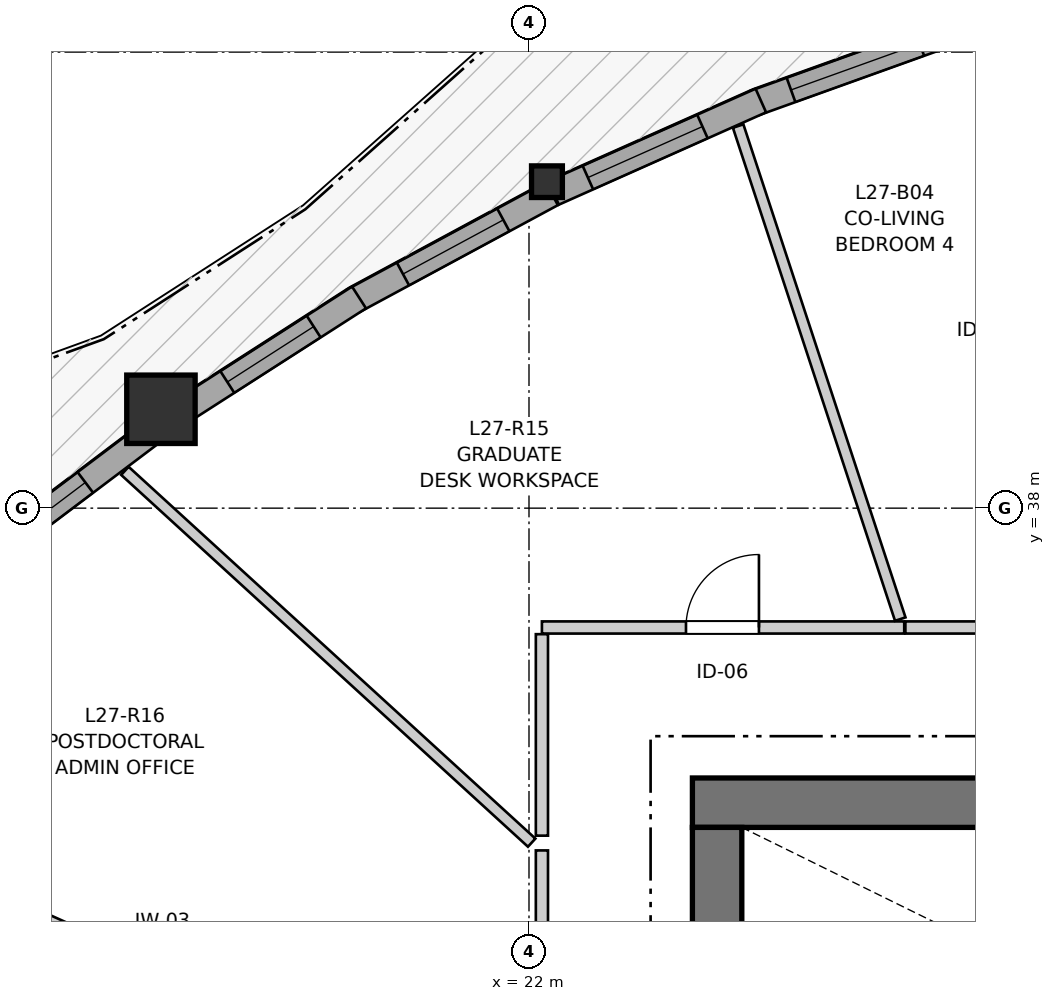
"""IFC4 building model, lengths in metres.
Left out: names, types, materials, properties, quantities, classifications, styles, units other than length and angle.
Written with IfcOpenShell. Run it as: python <this file> out.ifc"""

import sys

from ifc_helpers import new_model, si_unit, direction, frame, frame_2d, origin, origin_2d, place, context, subcontext, project, spatial, rectangle, i_section, extrude, source, transform, mapped, element, fill, save


model = new_model("IFC4")
c1 = context("Model", 3, precision=1e-05, world=origin(), true_north=direction((0.0, 1.0)))
c2 = subcontext(c1, "Body", "Model", "MODEL_VIEW")
j1 = project(units=[si_unit("LENGTHUNIT", "METRE"), si_unit("PLANEANGLEUNIT", "RADIAN")], contexts=[c1])
p1 = place(None, origin())
s1 = spatial("IfcSite", under=j1, at=p1, CompositionType="ELEMENT")
p2 = place(p1, origin())
s2 = spatial("IfcBuilding", under=s1, at=p2, CompositionType="ELEMENT")
p3 = place(p2, frame((0.0, 0.0, 92.8)))
s3 = spatial("IfcBuildingStorey", under=s2, at=p3, CompositionType="ELEMENT", Elevation=92.8)
p4 = place(p3, frame((36.55, 34.125, 0.0), z_axis=(0.0, 0.0, 1.0), x_axis=(-1.0, 0.0, 0.0)))
e1 = element("IfcWall", 1, at=p4, inside=s3, PredefinedType="SHEAR", context=c2, shape_type="SweptSolid", body=[
    extrude(rectangle(XDim=12.4, YDim=0.65, at=frame_2d((6.2, 0.0))), origin(), (0.0, 0.0, 1.0), 2.95),
])
p5 = place(p3, frame((24.475, 33.8, 0.0), z_axis=(0.0, 0.0, 1.0), x_axis=(0.0, -1.0, 0.0)))
e2 = element("IfcWall", 2, at=p5, inside=s3, PredefinedType="SHEAR", context=c2, shape_type="SweptSolid", body=[
    extrude(rectangle(XDim=15.6, YDim=0.65, at=frame_2d((7.8, 0.0))), origin(), (0.0, 0.0, 1.0), 2.95),
])
p6 = place(p5, frame((7.05, 0.0, 0.0)))
e3 = element("IfcOpeningElement", 3, at=p6, cuts=e2, PredefinedType="OPENING", context=c2, shape_type="SweptSolid", body=[
    extrude(rectangle(XDim=1.5, YDim=2.15, at=frame_2d((0.75, 1.075))), frame((0.0, 0.335, 0.0), z_axis=(0.0, -1.0, 0.0), x_axis=(1.0, 0.0, 0.0)), (0.0, 0.0, 1.0), 0.67),
])
p7 = place(p5, frame((3.52, 0.0, 0.0)))
e4 = element("IfcOpeningElement", 4, at=p7, cuts=e2, PredefinedType="OPENING", context=c2, shape_type="SweptSolid", body=[
    extrude(rectangle(XDim=0.86, YDim=2.05, at=frame_2d((0.43, 1.025))), frame((0.0, 0.335, 0.0), z_axis=(0.0, -1.0, 0.0), x_axis=(1.0, 0.0, 0.0)), (0.0, 0.0, 1.0), 0.67),
])
p8 = place(p5, frame((11.22, 0.0, 0.0)))
e5 = element("IfcOpeningElement", 5, at=p8, cuts=e2, PredefinedType="OPENING", context=c2, shape_type="SweptSolid", body=[
    extrude(rectangle(XDim=0.86, YDim=2.05, at=frame_2d((0.43, 1.025))), frame((0.0, 0.335, 0.0), z_axis=(0.0, -1.0, 0.0), x_axis=(1.0, 0.0, 0.0)), (0.0, 0.0, 1.0), 0.67),
])
m1 = source(origin(), c2, "Body", "SweptSolid", [
    extrude(i_section(OverallWidth=0.406, OverallDepth=0.416, WebThickness=0.027, FlangeThickness=0.044, FilletRadius=0.015, at=origin_2d()), origin(), (0.0, 0.0, 1.0), 2.95),
])
p9 = place(p3, frame((22.236, 42.295, 0.0), z_axis=(0.0, 0.0, 1.0), x_axis=(1.0, 0.0, 0.0)))
e6 = element("IfcColumn", 6, at=p9, inside=s3, PredefinedType="PILASTER", context=c2, shape_type="MappedRepresentation", body=[
    mapped(m1, transform((0.0, 0.0, 0.0), x_axis=(1.0, 0.0, 0.0), y_axis=(0.0, 1.0, 0.0), z_axis=(0.0, 0.0, 1.0), scale=1.0)),
])
m2 = source(origin(), c2, "Body", "SweptSolid", [
    extrude(rectangle(XDim=0.9, YDim=0.9, at=origin_2d()), origin(), (0.0, 0.0, 1.0), 2.95),
])
p10 = place(p3, frame((17.157, 39.301, 0.0), z_axis=(0.0, 0.0, 1.0), x_axis=(1.0, 0.0, 0.0)))
e7 = element("IfcColumn", 7, at=p10, inside=s3, PredefinedType="COLUMN", context=c2, shape_type="MappedRepresentation", body=[
    mapped(m2, transform((0.0, 0.0, 0.0), x_axis=(1.0, 0.0, 0.0), y_axis=(0.0, 1.0, 0.0), z_axis=(0.0, 0.0, 1.0), scale=1.0)),
])
p11 = place(p3, frame((27.611, 44.28, 0.0), z_axis=(0.0, 0.0, 1.0), x_axis=(-0.94110108123, -0.338125353836, 0.0)))
e8 = element("IfcWall", 8, at=p11, inside=s3, PredefinedType="SOLIDWALL", context=c2, shape_type="SweptSolid", body=[
    extrude(rectangle(XDim=2.809, YDim=0.34, at=frame_2d((1.404, 0.0))), origin(), (0.0, 0.0, 1.0), 2.48),
])
p12 = place(p11, frame((0.499, 0.0, 0.82)))
e9 = element("IfcOpeningElement", 9, at=p12, cuts=e8, PredefinedType="OPENING", context=c2, shape_type="SweptSolid", body=[
    extrude(rectangle(XDim=1.8, YDim=1.45, at=frame_2d((0.9, 0.725))), frame((0.0, 0.18, 0.0), z_axis=(0.0, -1.0, 0.0), x_axis=(1.0, 0.0, 0.0)), (0.0, 0.0, 1.0), 0.36),
])
p13 = place(p3, frame((25.05, 43.363, 0.0), z_axis=(0.0, 0.0, 1.0), x_axis=(-0.913433400489, -0.406988234315, 0.0)))
e10 = element("IfcWall", 10, at=p13, inside=s3, PredefinedType="SOLIDWALL", context=c2, shape_type="SweptSolid", body=[
    extrude(rectangle(XDim=2.985, YDim=0.34, at=frame_2d((1.492, 0.0))), origin(), (0.0, 0.0, 1.0), 2.48),
])
p14 = place(p13, frame((0.841, 0.0, 0.82)))
e11 = element("IfcOpeningElement", 11, at=p14, cuts=e10, PredefinedType="OPENING", context=c2, shape_type="SweptSolid", body=[
    extrude(rectangle(XDim=1.65, YDim=1.45, at=frame_2d((0.825, 0.725))), frame((0.0, 0.18, 0.0), z_axis=(0.0, -1.0, 0.0), x_axis=(1.0, 0.0, 0.0)), (0.0, 0.0, 1.0), 0.36),
])
p15 = place(p3, frame((22.299, 42.136, 0.0), z_axis=(0.0, 0.0, 1.0), x_axis=(-0.880093106551, -0.474801141323, 0.0)))
e12 = element("IfcWall", 12, at=p15, inside=s3, PredefinedType="SOLIDWALL", context=c2, shape_type="SweptSolid", body=[
    extrude(rectangle(XDim=2.968, YDim=0.34, at=frame_2d((1.484, 0.0))), origin(), (0.0, 0.0, 1.0), 2.48),
])
p16 = place(p15, frame((0.724, 0.0, 0.82)))
e13 = element("IfcOpeningElement", 13, at=p16, cuts=e12, PredefinedType="OPENING", context=c2, shape_type="SweptSolid", body=[
    extrude(rectangle(XDim=1.5, YDim=1.45, at=frame_2d((0.75, 0.725))), frame((0.0, 0.18, 0.0), z_axis=(0.0, -1.0, 0.0), x_axis=(1.0, 0.0, 0.0)), (0.0, 0.0, 1.0), 0.36),
])
p17 = place(p3, frame((19.764, 40.772, 0.0), z_axis=(0.0, 0.0, 1.0), x_axis=(-0.841500460675, -0.54025639717, 0.0)))
e14 = element("IfcWall", 14, at=p17, inside=s3, PredefinedType="SOLIDWALL", context=c2, shape_type="SweptSolid", body=[
    extrude(rectangle(XDim=2.758, YDim=0.34, at=frame_2d((1.379, 0.0))), origin(), (0.0, 0.0, 1.0), 2.48),
])
p18 = place(p17, frame((0.709, 0.0, 0.82)))
e15 = element("IfcOpeningElement", 15, at=p18, cuts=e14, PredefinedType="OPENING", context=c2, shape_type="SweptSolid", body=[
    extrude(rectangle(XDim=1.35, YDim=1.45, at=frame_2d((0.675, 0.725))), frame((0.0, 0.18, 0.0), z_axis=(0.0, -1.0, 0.0), x_axis=(1.0, 0.0, 0.0)), (0.0, 0.0, 1.0), 0.36),
])
p19 = place(p3, frame((17.076, 39.027, 0.0), z_axis=(0.0, 0.0, 1.0), x_axis=(-0.798403009583, -0.602123437751, 0.0)))
e16 = element("IfcWall", 16, at=p19, inside=s3, PredefinedType="SOLIDWALL", context=c2, shape_type="SweptSolid", body=[
    extrude(rectangle(XDim=2.775, YDim=0.34, at=frame_2d((1.387, 0.0))), origin(), (0.0, 0.0, 1.0), 2.48),
])
p20 = place(p19, frame((1.144, 0.0, 0.82)))
e17 = element("IfcOpeningElement", 17, at=p20, cuts=e16, PredefinedType="OPENING", context=c2, shape_type="SweptSolid", body=[
    extrude(rectangle(XDim=1.05, YDim=1.45, at=frame_2d((0.525, 0.725))), frame((0.0, 0.18, 0.0), z_axis=(0.0, -1.0, 0.0), x_axis=(1.0, 0.0, 0.0)), (0.0, 0.0, 1.0), 0.36),
])
p21 = place(p3, frame((22.17, 36.43, 0.0), z_axis=(0.0, 0.0, 1.0), x_axis=(1.0, 0.0, 0.0)))
e18 = element("IfcWall", 18, at=p21, inside=s3, PredefinedType="PARTITIONING", context=c2, shape_type="SweptSolid", body=[
    extrude(rectangle(XDim=4.767, YDim=0.16, at=frame_2d((2.384, 0.0))), origin(), (0.0, 0.0, 1.0), 2.588),
])
p22 = place(p21, frame((1.896, 0.0, 0.0)))
e19 = element("IfcOpeningElement", 19, at=p22, cuts=e18, PredefinedType="OPENING", context=c2, shape_type="SweptSolid", body=[
    extrude(rectangle(XDim=0.96, YDim=2.1, at=frame_2d((0.48, 1.05))), frame((0.0, 0.09, 0.0), z_axis=(0.0, -1.0, 0.0), x_axis=(1.0, 0.0, 0.0)), (0.0, 0.0, 1.0), 0.18),
])
p23 = place(p3, frame((22.17, 29.65, 0.0), z_axis=(0.0, 0.0, 1.0), x_axis=(0.0, 1.0, 0.0)))
e20 = element("IfcWall", 20, at=p23, inside=s3, PredefinedType="PARTITIONING", context=c2, shape_type="SweptSolid", body=[
    extrude(rectangle(XDim=3.847, YDim=0.16, at=frame_2d((1.924, 0.0))), origin(), (0.0, 0.0, 1.0), 2.95),
])
p24 = place(p23, frame((1.441, 0.0, 0.0)))
e21 = element("IfcOpeningElement", 21, at=p24, cuts=e20, PredefinedType="OPENING", context=c2, shape_type="SweptSolid", body=[
    extrude(rectangle(XDim=0.96, YDim=2.1, at=frame_2d((0.48, 1.05))), frame((0.0, 0.09, 0.0), z_axis=(0.0, -1.0, 0.0), x_axis=(1.0, 0.0, 0.0)), (0.0, 0.0, 1.0), 0.18),
])
p25 = place(p3, frame((26.952, 36.43, 0.0), z_axis=(0.0, 0.0, 1.0), x_axis=(1.0, 0.0, 0.0)))
e22 = element("IfcWall", 22, at=p25, inside=s3, PredefinedType="PARTITIONING", context=c2, shape_type="SweptSolid", body=[
    extrude(rectangle(XDim=3.562, YDim=0.16, at=frame_2d((1.781, 0.0))), origin(), (0.0, 0.0, 1.0), 2.95),
])
p26 = place(p25, frame((1.298, 0.0, 0.0)))
e23 = element("IfcOpeningElement", 23, at=p26, cuts=e22, PredefinedType="OPENING", context=c2, shape_type="SweptSolid", body=[
    extrude(rectangle(XDim=0.92, YDim=2.1, at=frame_2d((0.46, 1.05))), frame((0.0, 0.09, 0.0), z_axis=(0.0, -1.0, 0.0), x_axis=(1.0, 0.0, 0.0)), (0.0, 0.0, 1.0), 0.18),
])
p27 = place(p3, frame((11.817, 34.307, 0.0), z_axis=(0.0, 0.0, 1.0), x_axis=(0.912528092457, -0.409014034572, 0.0)))
e24 = element("IfcWall", 24, at=p27, inside=s3, PredefinedType="PARTITIONING", context=c2, shape_type="SweptSolid", body=[
    extrude(rectangle(XDim=11.218, YDim=0.145, at=frame_2d((5.609, 0.0))), origin(), (0.0, 0.0, 1.0), 2.95),
])
p28 = place(p3, frame((16.683, 38.491, 0.0), z_axis=(0.0, 0.0, 1.0), x_axis=(0.738145700324, -0.674641330704, 0.0)))
e25 = element("IfcWall", 25, at=p28, inside=s3, PredefinedType="PARTITIONING", context=c2, shape_type="SweptSolid", body=[
    extrude(rectangle(XDim=7.251, YDim=0.145, at=frame_2d((3.625, 0.0))), origin(), (0.0, 0.0, 1.0), 2.95),
])
p29 = place(p3, frame((24.752, 43.027, 0.0), z_axis=(0.0, 0.0, 1.0), x_axis=(0.312342290808, -0.949969627606, 0.0)))
e26 = element("IfcWall", 26, at=p29, inside=s3, PredefinedType="PARTITIONING", context=c2, shape_type="SweptSolid", body=[
    extrude(rectangle(XDim=6.828, YDim=0.145, at=frame_2d((3.414, 0.0))), origin(), (0.0, 0.0, 1.0), 2.95),
])
p30 = place(p3, frame((22.17, 33.691, 0.0), z_axis=(0.0, 0.0, 1.0), x_axis=(0.0, 1.0, 0.0)))
e27 = element("IfcWall", 27, at=p30, inside=s3, PredefinedType="PARTITIONING", context=c2, shape_type="SweptSolid", body=[
    extrude(rectangle(XDim=2.651, YDim=0.16, at=frame_2d((1.325, 0.0))), origin(), (0.0, 0.0, 1.0), 2.95),
])
m3 = source(origin(), c2, "Body", "SweptSolid", [
    extrude(rectangle(XDim=1.8, YDim=1.45, at=frame_2d((0.9, 0.725))), frame((0.0, 0.03, 0.0), z_axis=(0.0, -1.0, 0.0), x_axis=(1.0, 0.0, 0.0)), (0.0, 0.0, 1.0), 0.06),
])
p31 = place(p12, origin())
e28 = element("IfcWindow", 28, at=p31, inside=s3, PartitioningType="SINGLE_PANEL", PredefinedType="WINDOW", context=c2, shape_type="MappedRepresentation", body=[
    mapped(m3, transform((0.0, 0.0, 0.0), x_axis=(1.0, 0.0, 0.0), y_axis=(0.0, 1.0, 0.0), z_axis=(0.0, 0.0, 1.0), scale=1.0)),
])
fill(e9, e28)
m4 = source(origin(), c2, "Body", "SweptSolid", [
    extrude(rectangle(XDim=1.65, YDim=1.45, at=frame_2d((0.825, 0.725))), frame((0.0, 0.03, 0.0), z_axis=(0.0, -1.0, 0.0), x_axis=(1.0, 0.0, 0.0)), (0.0, 0.0, 1.0), 0.06),
])
p32 = place(p14, origin())
e29 = element("IfcWindow", 29, at=p32, inside=s3, PartitioningType="SINGLE_PANEL", PredefinedType="WINDOW", context=c2, shape_type="MappedRepresentation", body=[
    mapped(m4, transform((0.0, 0.0, 0.0), x_axis=(1.0, 0.0, 0.0), y_axis=(0.0, 1.0, 0.0), z_axis=(0.0, 0.0, 1.0), scale=1.0)),
])
fill(e11, e29)
m5 = source(origin(), c2, "Body", "SweptSolid", [
    extrude(rectangle(XDim=1.5, YDim=1.45, at=frame_2d((0.75, 0.725))), frame((0.0, 0.03, 0.0), z_axis=(0.0, -1.0, 0.0), x_axis=(1.0, 0.0, 0.0)), (0.0, 0.0, 1.0), 0.06),
])
p33 = place(p16, origin())
e30 = element("IfcWindow", 30, at=p33, inside=s3, PartitioningType="SINGLE_PANEL", PredefinedType="WINDOW", context=c2, shape_type="MappedRepresentation", body=[
    mapped(m5, transform((0.0, 0.0, 0.0), x_axis=(1.0, 0.0, 0.0), y_axis=(0.0, 1.0, 0.0), z_axis=(0.0, 0.0, 1.0), scale=1.0)),
])
fill(e13, e30)
m6 = source(origin(), c2, "Body", "SweptSolid", [
    extrude(rectangle(XDim=1.35, YDim=1.45, at=frame_2d((0.675, 0.725))), frame((0.0, 0.03, 0.0), z_axis=(0.0, -1.0, 0.0), x_axis=(1.0, 0.0, 0.0)), (0.0, 0.0, 1.0), 0.06),
])
p34 = place(p18, origin())
e31 = element("IfcWindow", 31, at=p34, inside=s3, PartitioningType="SINGLE_PANEL", PredefinedType="WINDOW", context=c2, shape_type="MappedRepresentation", body=[
    mapped(m6, transform((0.0, 0.0, 0.0), x_axis=(1.0, 0.0, 0.0), y_axis=(0.0, 1.0, 0.0), z_axis=(0.0, 0.0, 1.0), scale=1.0)),
])
fill(e15, e31)
m7 = source(origin(), c2, "Body", "SweptSolid", [
    extrude(rectangle(XDim=1.05, YDim=1.45, at=frame_2d((0.525, 0.725))), frame((0.0, 0.03, 0.0), z_axis=(0.0, -1.0, 0.0), x_axis=(1.0, 0.0, 0.0)), (0.0, 0.0, 1.0), 0.06),
])
p35 = place(p20, origin())
e32 = element("IfcWindow", 32, at=p35, inside=s3, PartitioningType="SINGLE_PANEL", PredefinedType="WINDOW", context=c2, shape_type="MappedRepresentation", body=[
    mapped(m7, transform((0.0, 0.0, 0.0), x_axis=(1.0, 0.0, 0.0), y_axis=(0.0, 1.0, 0.0), z_axis=(0.0, 0.0, 1.0), scale=1.0)),
])
fill(e17, e32)
m8 = source(origin(), c2, "Body", "SweptSolid", [
    extrude(rectangle(XDim=0.96, YDim=2.1, at=frame_2d((0.48, 1.05))), frame((0.0, 0.025, 0.0), z_axis=(0.0, -1.0, 0.0), x_axis=(1.0, 0.0, 0.0)), (0.0, 0.0, 1.0), 0.05),
])
p36 = place(p22, origin())
e33 = element("IfcDoor", 33, at=p36, inside=s3, OperationType="SINGLE_SWING_RIGHT", PredefinedType="DOOR", context=c2, shape_type="MappedRepresentation", body=[
    mapped(m8, transform((0.0, 0.0, 0.0), x_axis=(1.0, 0.0, 0.0), y_axis=(0.0, 1.0, 0.0), z_axis=(0.0, 0.0, 1.0), scale=1.0)),
])
fill(e19, e33)
save(model, sys.argv[1])
